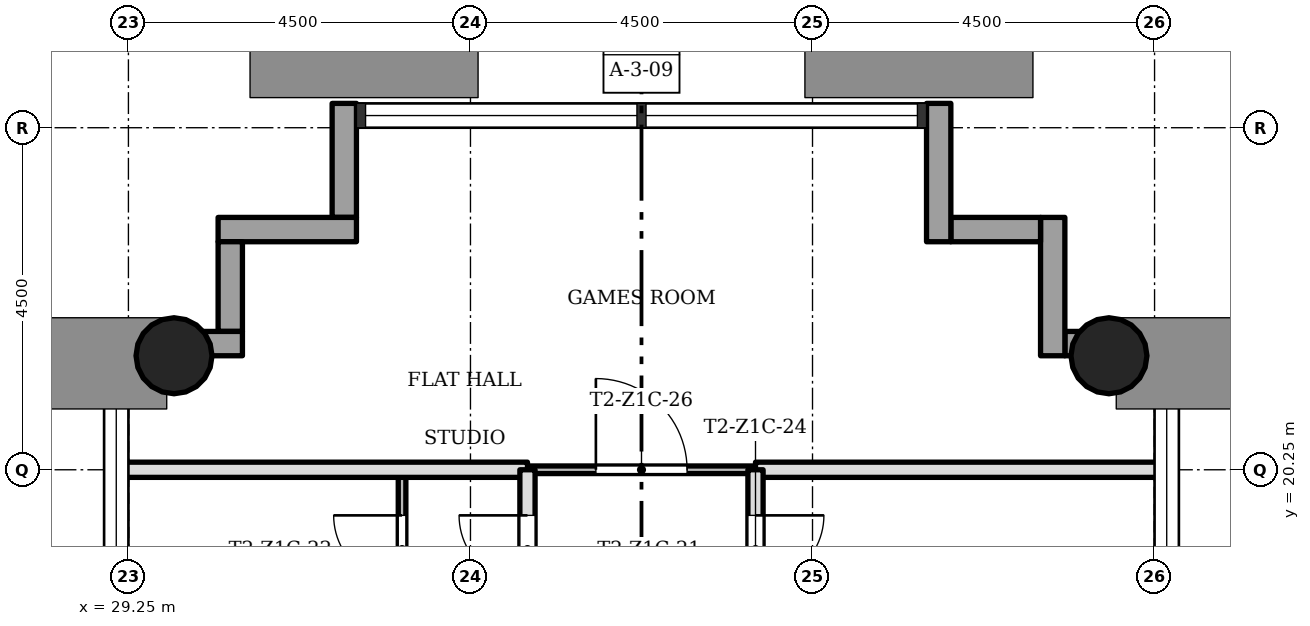
"""IFC4 building model, lengths in metres.
Left out: names, types, materials, properties, quantities, classifications, styles, units other than length and angle.
Written with IfcOpenShell. Run it as: python <this file> out.ifc"""

import sys

from ifc_helpers import new_model, si_unit, direction, frame, frame_2d, origin, origin_2d, place, context, subcontext, project, spatial, rectangle, hollow_circle, extrude, element, fill, save


model = new_model("IFC4")
c1 = context("Model", 3, precision=1e-05, world=origin(), true_north=direction((0.0, 1.0)))
c2 = subcontext(c1, "Body", "Model", "MODEL_VIEW")
j1 = project(units=[si_unit("LENGTHUNIT", "METRE"), si_unit("PLANEANGLEUNIT", "RADIAN")], contexts=[c1])
p1 = place(None, origin())
s1 = spatial("IfcSite", under=j1, at=p1, CompositionType="ELEMENT")
p2 = place(p1, origin())
s2 = spatial("IfcBuilding", under=s1, at=p2, CompositionType="ELEMENT")
p3 = place(p2, frame((0.0, 0.0, 51.7)))
s3 = spatial("IfcBuildingStorey", under=s2, at=p3, CompositionType="ELEMENT", Elevation=51.7)
for number, where, z_axis, x_axis in (
    (1, (42.15, 21.75, 0.0), (0.0, 0.0, 1.0), (1.0, 0.0, 0.0)),
    (2, (29.85, 21.75, 0.0), (0.0, 0.0, 1.0), (1.0, 0.0, 0.0)),
):
    element("IfcColumn", number, at=place(p3, frame(where, z_axis=z_axis, x_axis=x_axis)), inside=s3, PredefinedType="COLUMN", context=c2, shape_type="SweptSolid", body=[
        extrude(hollow_circle(Radius=0.5, WallThickness=0.036, at=origin_2d()), origin(), (0.0, 0.0, 1.0), 3.4),
    ])
p4 = place(p3, frame((43.07, 21.91, -0.3), z_axis=(0.0, 0.0, 1.0), x_axis=(-1.0, 0.0, 0.0)))
e3 = element("IfcWall", 3, at=p4, inside=s3, PredefinedType="STANDARD", context=c2, shape_type="SweptSolid", body=[
    extrude(rectangle(XDim=1.5, YDim=0.32, at=frame_2d((0.75, 0.0))), origin(), (0.0, 0.0, 1.0), 3.4),
])
p5 = place(p3, frame((41.41, 21.75, -0.3), z_axis=(0.0, 0.0, 1.0), x_axis=(0.0, 1.0, 0.0)))
e4 = element("IfcWall", 4, at=p5, inside=s3, PredefinedType="STANDARD", context=c2, shape_type="SweptSolid", body=[
    extrude(rectangle(XDim=1.82, YDim=0.32, at=frame_2d((0.91, 0.0))), origin(), (0.0, 0.0, 1.0), 3.4),
])
p6 = place(p3, frame((41.25, 23.41, -0.3), z_axis=(0.0, 0.0, 1.0), x_axis=(-1.0, 0.0, 0.0)))
e5 = element("IfcWall", 5, at=p6, inside=s3, PredefinedType="STANDARD", context=c2, shape_type="SweptSolid", body=[
    extrude(rectangle(XDim=1.18, YDim=0.32, at=frame_2d((0.59, 0.0))), origin(), (0.0, 0.0, 1.0), 3.4),
])
p7 = place(p3, frame((39.91, 23.25, -0.3), z_axis=(0.0, 0.0, 1.0), x_axis=(0.0, 1.0, 0.0)))
e6 = element("IfcWall", 6, at=p7, inside=s3, PredefinedType="STANDARD", context=c2, shape_type="SweptSolid", body=[
    extrude(rectangle(XDim=1.82, YDim=0.32, at=frame_2d((0.91, 0.0))), origin(), (0.0, 0.0, 1.0), 3.4),
])
p8 = place(p3, frame((32.09, 25.07, -0.3), z_axis=(0.0, 0.0, 1.0), x_axis=(0.0, -1.0, 0.0)))
e7 = element("IfcWall", 7, at=p8, inside=s3, PredefinedType="STANDARD", context=c2, shape_type="SweptSolid", body=[
    extrude(rectangle(XDim=1.5, YDim=0.32, at=frame_2d((0.75, 0.0))), origin(), (0.0, 0.0, 1.0), 3.4),
])
p9 = place(p3, frame((32.25, 23.41, -0.3), z_axis=(0.0, 0.0, 1.0), x_axis=(-1.0, 0.0, 0.0)))
e8 = element("IfcWall", 8, at=p9, inside=s3, PredefinedType="STANDARD", context=c2, shape_type="SweptSolid", body=[
    extrude(rectangle(XDim=1.82, YDim=0.32, at=frame_2d((0.91, 0.0))), origin(), (0.0, 0.0, 1.0), 3.4),
])
p10 = place(p3, frame((30.59, 23.25, -0.3), z_axis=(0.0, 0.0, 1.0), x_axis=(0.0, -1.0, 0.0)))
e9 = element("IfcWall", 9, at=p10, inside=s3, PredefinedType="STANDARD", context=c2, shape_type="SweptSolid", body=[
    extrude(rectangle(XDim=1.18, YDim=0.32, at=frame_2d((0.59, 0.0))), origin(), (0.0, 0.0, 1.0), 3.4),
])
p11 = place(p3, frame((30.75, 21.91, -0.3), z_axis=(0.0, 0.0, 1.0), x_axis=(-1.0, 0.0, 0.0)))
e10 = element("IfcWall", 10, at=p11, inside=s3, PredefinedType="STANDARD", context=c2, shape_type="SweptSolid", body=[
    extrude(rectangle(XDim=1.82, YDim=0.32, at=frame_2d((0.91, 0.0))), origin(), (0.0, 0.0, 1.0), 3.4),
])
p12 = place(p3, frame((37.5, 20.25, 0.0), z_axis=(0.0, 0.0, 1.0), x_axis=(-1.0, 0.0, 0.0)))
e11 = element("IfcWall", 11, at=p12, inside=s3, PredefinedType="PARTITIONING", context=c2, shape_type="SweptSolid", body=[
    extrude(rectangle(XDim=3.0, YDim=0.1, at=frame_2d((1.5, 0.0))), origin(), (0.0, 0.0, 1.0), 3.0),
])
p13 = place(p12, frame((0.9, 0.0, 0.0)))
e12 = element("IfcOpeningElement", 12, at=p13, cuts=e11, PredefinedType="OPENING", context=c2, shape_type="SweptSolid", body=[
    extrude(rectangle(XDim=1.2, YDim=2.1, at=frame_2d((0.6, 1.05))), frame((0.0, 0.06, 0.0), z_axis=(0.0, -1.0, 0.0), x_axis=(1.0, 0.0, 0.0)), (0.0, 0.0, 1.0), 0.12),
])
for number, where, z_axis, x_axis in (
    (13, (42.85, 20.25, 0.0), (0.0, 0.0, 1.0), (-1.0, 0.0, 0.0)),
    (14, (34.5, 20.25, 0.0), (0.0, 0.0, 1.0), (-1.0, 0.0, 0.0)),
):
    element("IfcWall", number, at=place(p3, frame(where, z_axis=z_axis, x_axis=x_axis)), inside=s3, PredefinedType="SOLIDWALL", context=c2, shape_type="SweptSolid", body=[
        extrude(rectangle(XDim=5.35, YDim=0.2, at=frame_2d((2.675, 0.0))), origin(), (0.0, 0.0, 1.0), 3.0),
    ])
p14 = place(p3, frame((37.5, 15.75, 0.0), z_axis=(0.0, 0.0, 1.0), x_axis=(0.0, 1.0, 0.0)))
e15 = element("IfcWall", 15, at=p14, inside=s3, PredefinedType="SOLIDWALL", context=c2, shape_type="SweptSolid", body=[
    extrude(rectangle(XDim=4.5, YDim=0.2, at=frame_2d((2.25, 0.0))), origin(), (0.0, 0.0, 1.0), 3.0),
])
p15 = place(p14, frame((3.0, 0.0, 0.0)))
e16 = element("IfcOpeningElement", 16, at=p15, cuts=e15, PredefinedType="OPENING", context=c2, shape_type="SweptSolid", body=[
    extrude(rectangle(XDim=0.9, YDim=2.1, at=frame_2d((0.45, 1.05))), frame((0.0, 0.11, 0.0), z_axis=(0.0, -1.0, 0.0), x_axis=(1.0, 0.0, 0.0)), (0.0, 0.0, 1.0), 0.22),
])
p16 = place(p3, frame((34.5, 15.75, 0.0), z_axis=(0.0, 0.0, 1.0), x_axis=(0.0, 1.0, 0.0)))
e17 = element("IfcWall", 17, at=p16, inside=s3, PredefinedType="SOLIDWALL", context=c2, shape_type="SweptSolid", body=[
    extrude(rectangle(XDim=4.5, YDim=0.2, at=frame_2d((2.25, 0.0))), origin(), (0.0, 0.0, 1.0), 3.0),
])
p17 = place(p16, frame((3.0, 0.0, 0.0)))
e18 = element("IfcOpeningElement", 18, at=p17, cuts=e17, PredefinedType="OPENING", context=c2, shape_type="SweptSolid", body=[
    extrude(rectangle(XDim=0.9, YDim=2.1, at=frame_2d((0.45, 1.05))), frame((0.0, 0.11, 0.0), z_axis=(0.0, -1.0, 0.0), x_axis=(1.0, 0.0, 0.0)), (0.0, 0.0, 1.0), 0.22),
])
p18 = place(p3, frame((32.85, 15.75, 0.0), z_axis=(0.0, 0.0, 1.0), x_axis=(0.0, 1.0, 0.0)))
e19 = element("IfcWall", 19, at=p18, inside=s3, PredefinedType="PARTITIONING", context=c2, shape_type="SweptSolid", body=[
    extrude(rectangle(XDim=4.5, YDim=0.1, at=frame_2d((2.25, 0.0))), origin(), (0.0, 0.0, 1.0), 3.0),
])
p19 = place(p18, frame((3.0, 0.0, 0.0)))
e20 = element("IfcOpeningElement", 20, at=p19, cuts=e19, PredefinedType="OPENING", context=c2, shape_type="SweptSolid", body=[
    extrude(rectangle(XDim=0.9, YDim=2.1, at=frame_2d((0.45, 1.05))), frame((0.0, 0.06, 0.0), z_axis=(0.0, -1.0, 0.0), x_axis=(1.0, 0.0, 0.0)), (0.0, 0.0, 1.0), 0.12),
])
p20 = place(p17, origin())
e21 = element("IfcDoor", 21, at=p20, inside=s3, OperationType="SINGLE_SWING_LEFT", PredefinedType="DOOR", context=c2, shape_type="SweptSolid", body=[
    extrude(rectangle(XDim=0.9, YDim=2.1, at=frame_2d((0.45, 1.05))), frame((0.0, 0.025, 0.0), z_axis=(0.0, -1.0, 0.0), x_axis=(1.0, 0.0, 0.0)), (0.0, 0.0, 1.0), 0.05),
])
fill(e18, e21)
p21 = place(p19, origin())
e22 = element("IfcDoor", 22, at=p21, inside=s3, OperationType="SINGLE_SWING_LEFT", PredefinedType="DOOR", context=c2, shape_type="SweptSolid", body=[
    extrude(rectangle(XDim=0.9, YDim=2.1, at=frame_2d((0.45, 1.05))), frame((0.0, 0.025, 0.0), z_axis=(0.0, -1.0, 0.0), x_axis=(1.0, 0.0, 0.0)), (0.0, 0.0, 1.0), 0.05),
])
fill(e20, e22)
p22 = place(p15, origin())
e23 = element("IfcDoor", 23, at=p22, inside=s3, OperationType="SINGLE_SWING_RIGHT", PredefinedType="DOOR", context=c2, shape_type="SweptSolid", body=[
    extrude(rectangle(XDim=0.9, YDim=2.1, at=frame_2d((0.45, 1.05))), frame((0.0, 0.025, 0.0), z_axis=(0.0, -1.0, 0.0), x_axis=(1.0, 0.0, 0.0)), (0.0, 0.0, 1.0), 0.05),
])
fill(e16, e23)
p23 = place(p13, origin())
e24 = element("IfcDoor", 24, at=p23, inside=s3, OperationType="SINGLE_SWING_RIGHT", PredefinedType="DOOR", context=c2, shape_type="SweptSolid", body=[
    extrude(rectangle(XDim=1.2, YDim=2.1, at=frame_2d((0.6, 1.05))), frame((0.0, 0.025, 0.0), z_axis=(0.0, -1.0, 0.0), x_axis=(1.0, 0.0, 0.0)), (0.0, 0.0, 1.0), 0.05),
])
fill(e12, e24)
save(model, sys.argv[1])
